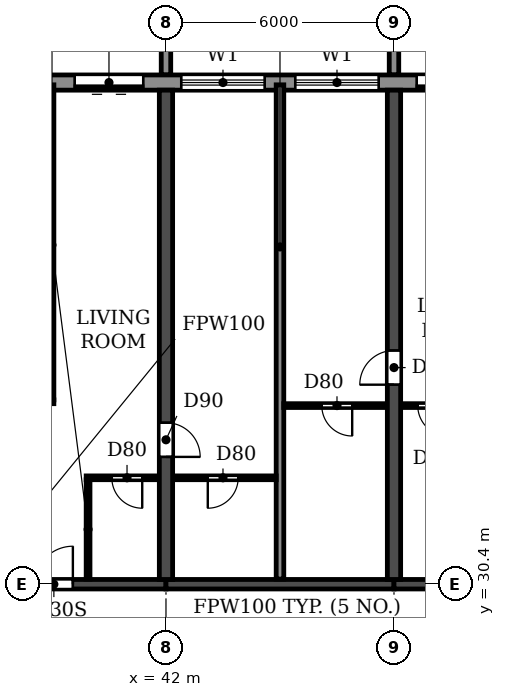
"""IFC4 building model, lengths in metres.
Left out: names, types, materials, properties, quantities, classifications, styles, units other than length and angle.
Written with IfcOpenShell. Run it as: python <this file> out.ifc"""

import sys

from ifc_helpers import new_model, si_unit, direction, frame, frame_2d, origin, place, context, subcontext, project, spatial, polyline, rectangle, outline, extrude, source, transform, mapped, element, fill, save


model = new_model("IFC4")
c1 = context("Model", 3, precision=1e-05, world=origin(), true_north=direction((0.0, 1.0)))
c2 = subcontext(c1, "Body", "Model", "MODEL_VIEW")
j1 = project(units=[si_unit("LENGTHUNIT", "METRE"), si_unit("PLANEANGLEUNIT", "RADIAN")], contexts=[c1])
p1 = place(None, origin())
s1 = spatial("IfcSite", under=j1, at=p1, CompositionType="ELEMENT")
p2 = place(p1, origin())
s2 = spatial("IfcBuilding", under=s1, at=p2, CompositionType="ELEMENT")
p3 = place(p2, frame((0.0, 0.0, 109.2)))
s3 = spatial("IfcBuildingStorey", under=s2, at=p3, CompositionType="ELEMENT", Elevation=109.2)
p4 = place(p3, frame((42.0, 30.525, 0.0), z_axis=(0.0, 0.0, 1.0), x_axis=(0.0, 1.0, 0.0)))
e1 = element("IfcWall", 1, at=p4, inside=s3, PredefinedType="SHEAR", context=c2, shape_type="SweptSolid", body=[
    extrude(rectangle(XDim=12.875, YDim=0.35, at=frame_2d((6.438, 0.0))), origin(), (0.0, 0.0, 1.0), 3.06),
])
p5 = place(p4, frame((3.225, 0.0, 0.0)))
e2 = element("IfcOpeningElement", 2, at=p5, cuts=e1, PredefinedType="OPENING", context=c2, shape_type="SweptSolid", body=[
    extrude(rectangle(XDim=0.9, YDim=2.1, at=frame_2d((0.45, 1.05))), frame((0.0, 0.185, 0.0), z_axis=(0.0, -1.0, 0.0), x_axis=(1.0, 0.0, 0.0)), (0.0, 0.0, 1.0), 0.37),
])
p6 = place(p3, frame((48.0, 30.525, 0.0), z_axis=(0.0, 0.0, 1.0), x_axis=(0.0, 1.0, 0.0)))
e3 = element("IfcWall", 3, at=p6, inside=s3, PredefinedType="SHEAR", context=c2, shape_type="SweptSolid", body=[
    extrude(rectangle(XDim=12.875, YDim=0.35, at=frame_2d((6.438, 0.0))), origin(), (0.0, 0.0, 1.0), 3.06),
])
p7 = place(p6, frame((5.125, 0.0, 0.0)))
e4 = element("IfcOpeningElement", 4, at=p7, cuts=e3, PredefinedType="OPENING", context=c2, shape_type="SweptSolid", body=[
    extrude(rectangle(XDim=0.9, YDim=2.1, at=frame_2d((0.45, 1.05))), frame((0.0, 0.185, 0.0), z_axis=(0.0, -1.0, 0.0), x_axis=(1.0, 0.0, 0.0)), (0.0, 0.0, 1.0), 0.37),
])
p8 = place(p3, frame((36.0, 30.4, 0.0), z_axis=(0.0, 0.0, 1.0), x_axis=(1.0, 0.0, 0.0)))
e5 = element("IfcWall", 5, at=p8, inside=s3, PredefinedType="SHEAR", context=c2, shape_type="SweptSolid", body=[
    extrude(rectangle(XDim=6.0, YDim=0.25, at=frame_2d((3.0, 0.0))), origin(), (0.0, 0.0, 1.0), 2.46),
])
p9 = place(p8, frame((2.55, 0.0, 0.0)))
e6 = element("IfcOpeningElement", 6, at=p9, cuts=e5, PredefinedType="OPENING", context=c2, shape_type="SweptSolid", body=[
    extrude(rectangle(XDim=1.0, YDim=2.1, at=frame_2d((0.5, 1.05))), frame((0.0, 0.135, 0.0), z_axis=(0.0, -1.0, 0.0), x_axis=(1.0, 0.0, 0.0)), (0.0, 0.0, 1.0), 0.27),
])
p10 = place(p3, frame((42.0, 30.4, 0.0), z_axis=(0.0, 0.0, 1.0), x_axis=(1.0, 0.0, 0.0)))
e7 = element("IfcWall", 7, at=p10, inside=s3, PredefinedType="SHEAR", context=c2, shape_type="SweptSolid", body=[
    extrude(rectangle(XDim=6.0, YDim=0.25, at=frame_2d((3.0, 0.0))), origin(), (0.0, 0.0, 1.0), 2.46),
])
p11 = place(p3, frame((48.0, 30.4, 0.0), z_axis=(0.0, 0.0, 1.0), x_axis=(1.0, 0.0, 0.0)))
e8 = element("IfcWall", 8, at=p11, inside=s3, PredefinedType="SHEAR", context=c2, shape_type="SweptSolid", body=[
    extrude(rectangle(XDim=6.0, YDim=0.25, at=frame_2d((3.0, 0.0))), origin(), (0.0, 0.0, 1.0), 2.46),
])
p12 = place(p11, frame((2.45, 0.0, 0.0)))
e9 = element("IfcOpeningElement", 9, at=p12, cuts=e8, PredefinedType="OPENING", context=c2, shape_type="SweptSolid", body=[
    extrude(rectangle(XDim=1.0, YDim=2.1, at=frame_2d((0.5, 1.05))), frame((0.0, 0.135, 0.0), z_axis=(0.0, -1.0, 0.0), x_axis=(1.0, 0.0, 0.0)), (0.0, 0.0, 1.0), 0.27),
])
p13 = place(p3, frame((85.317, 43.6, 0.0), z_axis=(0.0, 0.0, 1.0), x_axis=(-1.0, 0.0, 0.0)))
e10 = element("IfcWall", 10, at=p13, inside=s3, PredefinedType="STANDARD", context=c2, shape_type="SweptSolid", body=[
    extrude(rectangle(XDim=68.634, YDim=0.4, at=frame_2d((34.317, 0.0))), origin(), (0.0, 0.0, 1.0), 3.06),
])
p14 = place(p13, frame((64.917, 0.0, 0.0)))
e11 = element("IfcOpeningElement", 11, at=p14, cuts=e10, PredefinedType="OPENING", context=c2, shape_type="SweptSolid", body=[
    extrude(rectangle(XDim=1.8, YDim=2.4, at=frame_2d((0.9, 1.2))), frame((0.0, 0.21, 0.0), z_axis=(0.0, -1.0, 0.0), x_axis=(1.0, 0.0, 0.0)), (0.0, 0.0, 1.0), 0.42),
])
p15 = place(p13, frame((61.717, 0.0, 0.9)))
e12 = element("IfcOpeningElement", 12, at=p15, cuts=e10, PredefinedType="OPENING", context=c2, shape_type="SweptSolid", body=[
    extrude(rectangle(XDim=2.2, YDim=1.5, at=frame_2d((1.1, 0.75))), frame((0.0, 0.21, 0.0), z_axis=(0.0, -1.0, 0.0), x_axis=(1.0, 0.0, 0.0)), (0.0, 0.0, 1.0), 0.42),
])
p16 = place(p13, frame((58.717, 0.0, 0.9)))
e13 = element("IfcOpeningElement", 13, at=p16, cuts=e10, PredefinedType="OPENING", context=c2, shape_type="SweptSolid", body=[
    extrude(rectangle(XDim=2.2, YDim=1.5, at=frame_2d((1.1, 0.75))), frame((0.0, 0.21, 0.0), z_axis=(0.0, -1.0, 0.0), x_axis=(1.0, 0.0, 0.0)), (0.0, 0.0, 1.0), 0.42),
])
p17 = place(p13, frame((55.917, 0.0, 0.0)))
e14 = element("IfcOpeningElement", 14, at=p17, cuts=e10, PredefinedType="OPENING", context=c2, shape_type="SweptSolid", body=[
    extrude(rectangle(XDim=1.8, YDim=2.4, at=frame_2d((0.9, 1.2))), frame((0.0, 0.21, 0.0), z_axis=(0.0, -1.0, 0.0), x_axis=(1.0, 0.0, 0.0)), (0.0, 0.0, 1.0), 0.42),
])
p18 = place(p13, frame((52.917, 0.0, 0.0)))
e15 = element("IfcOpeningElement", 15, at=p18, cuts=e10, PredefinedType="OPENING", context=c2, shape_type="SweptSolid", body=[
    extrude(rectangle(XDim=1.8, YDim=2.4, at=frame_2d((0.9, 1.2))), frame((0.0, 0.21, 0.0), z_axis=(0.0, -1.0, 0.0), x_axis=(1.0, 0.0, 0.0)), (0.0, 0.0, 1.0), 0.42),
])
p19 = place(p13, frame((49.717, 0.0, 0.9)))
e16 = element("IfcOpeningElement", 16, at=p19, cuts=e10, PredefinedType="OPENING", context=c2, shape_type="SweptSolid", body=[
    extrude(rectangle(XDim=2.2, YDim=1.5, at=frame_2d((1.1, 0.75))), frame((0.0, 0.21, 0.0), z_axis=(0.0, -1.0, 0.0), x_axis=(1.0, 0.0, 0.0)), (0.0, 0.0, 1.0), 0.42),
])
p20 = place(p13, frame((46.717, 0.0, 0.9)))
e17 = element("IfcOpeningElement", 17, at=p20, cuts=e10, PredefinedType="OPENING", context=c2, shape_type="SweptSolid", body=[
    extrude(rectangle(XDim=2.2, YDim=1.5, at=frame_2d((1.1, 0.75))), frame((0.0, 0.21, 0.0), z_axis=(0.0, -1.0, 0.0), x_axis=(1.0, 0.0, 0.0)), (0.0, 0.0, 1.0), 0.42),
])
p21 = place(p13, frame((43.917, 0.0, 0.0)))
e18 = element("IfcOpeningElement", 18, at=p21, cuts=e10, PredefinedType="OPENING", context=c2, shape_type="SweptSolid", body=[
    extrude(rectangle(XDim=1.8, YDim=2.4, at=frame_2d((0.9, 1.2))), frame((0.0, 0.21, 0.0), z_axis=(0.0, -1.0, 0.0), x_axis=(1.0, 0.0, 0.0)), (0.0, 0.0, 1.0), 0.42),
])
p22 = place(p13, frame((40.717, 0.0, 0.9)))
e19 = element("IfcOpeningElement", 19, at=p22, cuts=e10, PredefinedType="OPENING", context=c2, shape_type="SweptSolid", body=[
    extrude(rectangle(XDim=2.2, YDim=1.5, at=frame_2d((1.1, 0.75))), frame((0.0, 0.21, 0.0), z_axis=(0.0, -1.0, 0.0), x_axis=(1.0, 0.0, 0.0)), (0.0, 0.0, 1.0), 0.42),
])
p23 = place(p13, frame((37.717, 0.0, 0.9)))
e20 = element("IfcOpeningElement", 20, at=p23, cuts=e10, PredefinedType="OPENING", context=c2, shape_type="SweptSolid", body=[
    extrude(rectangle(XDim=2.2, YDim=1.5, at=frame_2d((1.1, 0.75))), frame((0.0, 0.21, 0.0), z_axis=(0.0, -1.0, 0.0), x_axis=(1.0, 0.0, 0.0)), (0.0, 0.0, 1.0), 0.42),
])
p24 = place(p13, frame((34.917, 0.0, 0.0)))
e21 = element("IfcOpeningElement", 21, at=p24, cuts=e10, PredefinedType="OPENING", context=c2, shape_type="SweptSolid", body=[
    extrude(rectangle(XDim=1.8, YDim=2.4, at=frame_2d((0.9, 1.2))), frame((0.0, 0.21, 0.0), z_axis=(0.0, -1.0, 0.0), x_axis=(1.0, 0.0, 0.0)), (0.0, 0.0, 1.0), 0.42),
])
p25 = place(p13, frame((31.717, 0.0, 0.9)))
e22 = element("IfcOpeningElement", 22, at=p25, cuts=e10, PredefinedType="OPENING", context=c2, shape_type="SweptSolid", body=[
    extrude(rectangle(XDim=2.2, YDim=1.5, at=frame_2d((1.1, 0.75))), frame((0.0, 0.21, 0.0), z_axis=(0.0, -1.0, 0.0), x_axis=(1.0, 0.0, 0.0)), (0.0, 0.0, 1.0), 0.42),
])
p26 = place(p13, frame((28.917, 0.0, 0.0)))
e23 = element("IfcOpeningElement", 23, at=p26, cuts=e10, PredefinedType="OPENING", context=c2, shape_type="SweptSolid", body=[
    extrude(rectangle(XDim=1.8, YDim=2.4, at=frame_2d((0.9, 1.2))), frame((0.0, 0.21, 0.0), z_axis=(0.0, -1.0, 0.0), x_axis=(1.0, 0.0, 0.0)), (0.0, 0.0, 1.0), 0.42),
])
p27 = place(p13, frame((25.717, 0.0, 0.9)))
e24 = element("IfcOpeningElement", 24, at=p27, cuts=e10, PredefinedType="OPENING", context=c2, shape_type="SweptSolid", body=[
    extrude(rectangle(XDim=2.2, YDim=1.5, at=frame_2d((1.1, 0.75))), frame((0.0, 0.21, 0.0), z_axis=(0.0, -1.0, 0.0), x_axis=(1.0, 0.0, 0.0)), (0.0, 0.0, 1.0), 0.42),
])
p28 = place(p13, frame((22.717, 0.0, 0.9)))
e25 = element("IfcOpeningElement", 25, at=p28, cuts=e10, PredefinedType="OPENING", context=c2, shape_type="SweptSolid", body=[
    extrude(rectangle(XDim=2.2, YDim=1.5, at=frame_2d((1.1, 0.75))), frame((0.0, 0.21, 0.0), z_axis=(0.0, -1.0, 0.0), x_axis=(1.0, 0.0, 0.0)), (0.0, 0.0, 1.0), 0.42),
])
p29 = place(p13, frame((19.917, 0.0, 0.0)))
e26 = element("IfcOpeningElement", 26, at=p29, cuts=e10, PredefinedType="OPENING", context=c2, shape_type="SweptSolid", body=[
    extrude(rectangle(XDim=1.8, YDim=2.4, at=frame_2d((0.9, 1.2))), frame((0.0, 0.21, 0.0), z_axis=(0.0, -1.0, 0.0), x_axis=(1.0, 0.0, 0.0)), (0.0, 0.0, 1.0), 0.42),
])
p30 = place(p13, frame((16.717, 0.0, 0.9)))
e27 = element("IfcOpeningElement", 27, at=p30, cuts=e10, PredefinedType="OPENING", context=c2, shape_type="SweptSolid", body=[
    extrude(rectangle(XDim=2.2, YDim=1.5, at=frame_2d((1.1, 0.75))), frame((0.0, 0.21, 0.0), z_axis=(0.0, -1.0, 0.0), x_axis=(1.0, 0.0, 0.0)), (0.0, 0.0, 1.0), 0.42),
])
p31 = place(p13, frame((13.917, 0.0, 0.0)))
e28 = element("IfcOpeningElement", 28, at=p31, cuts=e10, PredefinedType="OPENING", context=c2, shape_type="SweptSolid", body=[
    extrude(rectangle(XDim=1.8, YDim=2.4, at=frame_2d((0.9, 1.2))), frame((0.0, 0.21, 0.0), z_axis=(0.0, -1.0, 0.0), x_axis=(1.0, 0.0, 0.0)), (0.0, 0.0, 1.0), 0.42),
])
p32 = place(p13, frame((10.717, 0.0, 0.9)))
e29 = element("IfcOpeningElement", 29, at=p32, cuts=e10, PredefinedType="OPENING", context=c2, shape_type="SweptSolid", body=[
    extrude(rectangle(XDim=2.2, YDim=1.5, at=frame_2d((1.1, 0.75))), frame((0.0, 0.21, 0.0), z_axis=(0.0, -1.0, 0.0), x_axis=(1.0, 0.0, 0.0)), (0.0, 0.0, 1.0), 0.42),
])
p33 = place(p13, frame((7.717, 0.0, 0.9)))
e30 = element("IfcOpeningElement", 30, at=p33, cuts=e10, PredefinedType="OPENING", context=c2, shape_type="SweptSolid", body=[
    extrude(rectangle(XDim=2.2, YDim=1.5, at=frame_2d((1.1, 0.75))), frame((0.0, 0.21, 0.0), z_axis=(0.0, -1.0, 0.0), x_axis=(1.0, 0.0, 0.0)), (0.0, 0.0, 1.0), 0.42),
])
p34 = place(p13, frame((4.917, 0.0, 0.0)))
e31 = element("IfcOpeningElement", 31, at=p34, cuts=e10, PredefinedType="OPENING", context=c2, shape_type="SweptSolid", body=[
    extrude(rectangle(XDim=1.8, YDim=2.4, at=frame_2d((0.9, 1.2))), frame((0.0, 0.21, 0.0), z_axis=(0.0, -1.0, 0.0), x_axis=(1.0, 0.0, 0.0)), (0.0, 0.0, 1.0), 0.42),
])
p35 = place(p13, frame((1.717, 0.0, 0.9)))
e32 = element("IfcOpeningElement", 32, at=p35, cuts=e10, PredefinedType="OPENING", context=c2, shape_type="SweptSolid", body=[
    extrude(rectangle(XDim=2.2, YDim=1.5, at=frame_2d((1.1, 0.75))), frame((0.0, 0.21, 0.0), z_axis=(0.0, -1.0, 0.0), x_axis=(1.0, 0.0, 0.0)), (0.0, 0.0, 1.0), 0.42),
])
m1 = source(origin(), c2, "Body", "SweptSolid", [
    extrude(outline(polyline([(0.0, 0.0), (0.25, 0.0), (0.25, 3.1), (0.0, 3.1), (0.0, 0.0)])), origin(), (0.0, 0.0, 1.0), 3.1),
])
for number, where in (
    (33, (41.875, 43.8, 0.0)),
    (34, (47.875, 43.8, 0.0)),
):
    element("IfcWall", number, at=place(p3, frame(where)), inside=s3, PredefinedType="STANDARD", context=c2, shape_type="MappedRepresentation", body=[
        mapped(m1, transform((0.0, 0.0, 0.0))),
    ])
p36 = place(p3, frame((45.0, 30.535, 0.0), z_axis=(0.0, 0.0, 1.0), x_axis=(0.0, 1.0, 0.0)))
e35 = element("IfcWall", 35, at=p36, inside=s3, PredefinedType="PARTITIONING", context=c2, shape_type="SweptSolid", body=[
    extrude(rectangle(XDim=13.005, YDim=0.2, at=frame_2d((6.502, 0.0))), origin(), (0.0, 0.0, 1.0), 3.06),
])
p37 = place(p3, frame((39.9, 33.2, 0.0), z_axis=(0.0, 0.0, 1.0), x_axis=(1.0, 0.0, 0.0)))
e36 = element("IfcWall", 36, at=p37, inside=s3, PredefinedType="PARTITIONING", context=c2, shape_type="SweptSolid", body=[
    extrude(rectangle(XDim=1.915, YDim=0.1, at=frame_2d((0.958, 0.0))), origin(), (0.0, 0.0, 1.0), 3.06),
])
p38 = place(p37, frame((0.675, 0.0, 0.0)))
e37 = element("IfcOpeningElement", 37, at=p38, cuts=e36, PredefinedType="OPENING", context=c2, shape_type="SweptSolid", body=[
    extrude(rectangle(XDim=0.8, YDim=2.1, at=frame_2d((0.4, 1.05))), frame((0.0, 0.06, 0.0), z_axis=(0.0, -1.0, 0.0), x_axis=(1.0, 0.0, 0.0)), (0.0, 0.0, 1.0), 0.12),
])
p39 = place(p3, frame((42.185, 33.2, 0.0), z_axis=(0.0, 0.0, 1.0), x_axis=(1.0, 0.0, 0.0)))
e38 = element("IfcWall", 38, at=p39, inside=s3, PredefinedType="PARTITIONING", context=c2, shape_type="SweptSolid", body=[
    extrude(rectangle(XDim=2.715, YDim=0.1, at=frame_2d((1.357, 0.0))), origin(), (0.0, 0.0, 1.0), 3.06),
])
p40 = place(p39, frame((0.915, 0.0, 0.0)))
e39 = element("IfcOpeningElement", 39, at=p40, cuts=e38, PredefinedType="OPENING", context=c2, shape_type="SweptSolid", body=[
    extrude(rectangle(XDim=0.8, YDim=2.1, at=frame_2d((0.4, 1.05))), frame((0.0, 0.06, 0.0), z_axis=(0.0, -1.0, 0.0), x_axis=(1.0, 0.0, 0.0)), (0.0, 0.0, 1.0), 0.12),
])
p41 = place(p3, frame((45.1, 35.1, 0.0), z_axis=(0.0, 0.0, 1.0), x_axis=(1.0, 0.0, 0.0)))
e40 = element("IfcWall", 40, at=p41, inside=s3, PredefinedType="PARTITIONING", context=c2, shape_type="SweptSolid", body=[
    extrude(rectangle(XDim=2.715, YDim=0.1, at=frame_2d((1.357, 0.0))), origin(), (0.0, 0.0, 1.0), 3.06),
])
p42 = place(p41, frame((1.0, 0.0, 0.0)))
e41 = element("IfcOpeningElement", 41, at=p42, cuts=e40, PredefinedType="OPENING", context=c2, shape_type="SweptSolid", body=[
    extrude(rectangle(XDim=0.8, YDim=2.1, at=frame_2d((0.4, 1.05))), frame((0.0, 0.06, 0.0), z_axis=(0.0, -1.0, 0.0), x_axis=(1.0, 0.0, 0.0)), (0.0, 0.0, 1.0), 0.12),
])
p43 = place(p3, frame((48.185, 35.1, 0.0), z_axis=(0.0, 0.0, 1.0), x_axis=(1.0, 0.0, 0.0)))
e42 = element("IfcWall", 42, at=p43, inside=s3, PredefinedType="PARTITIONING", context=c2, shape_type="SweptSolid", body=[
    extrude(rectangle(XDim=1.915, YDim=0.1, at=frame_2d((0.958, 0.0))), origin(), (0.0, 0.0, 1.0), 3.06),
])
p44 = place(p43, frame((0.44, 0.0, 0.0)))
e43 = element("IfcOpeningElement", 43, at=p44, cuts=e42, PredefinedType="OPENING", context=c2, shape_type="SweptSolid", body=[
    extrude(rectangle(XDim=0.8, YDim=2.1, at=frame_2d((0.4, 1.05))), frame((0.0, 0.06, 0.0), z_axis=(0.0, -1.0, 0.0), x_axis=(1.0, 0.0, 0.0)), (0.0, 0.0, 1.0), 0.12),
])
p45 = place(p3, frame((36.185, 35.2, 0.0), z_axis=(0.0, 0.0, 1.0), x_axis=(1.0, 0.0, 0.0)))
e44 = element("IfcWall", 44, at=p45, inside=s3, PredefinedType="PARTITIONING", context=c2, shape_type="SweptSolid", body=[
    extrude(rectangle(XDim=2.865, YDim=0.1, at=frame_2d((1.433, 0.0))), origin(), (0.0, 0.0, 1.0), 3.06),
])
p46 = place(p45, frame((0.315, 0.0, 0.0)))
e45 = element("IfcOpeningElement", 45, at=p46, cuts=e44, PredefinedType="OPENING", context=c2, shape_type="SweptSolid", body=[
    extrude(rectangle(XDim=0.9, YDim=2.1, at=frame_2d((0.45, 1.05))), frame((0.0, 0.06, 0.0), z_axis=(0.0, -1.0, 0.0), x_axis=(1.0, 0.0, 0.0)), (0.0, 0.0, 1.0), 0.12),
])
p47 = place(p3, frame((39.0, 35.25, 0.0), z_axis=(0.0, 0.0, 1.0), x_axis=(0.0, 1.0, 0.0)))
e46 = element("IfcWall", 46, at=p47, inside=s3, PredefinedType="PARTITIONING", context=c2, shape_type="SweptSolid", body=[
    extrude(rectangle(XDim=8.29, YDim=0.1, at=frame_2d((4.145, 0.0))), origin(), (0.0, 0.0, 1.0), 3.06),
])
p48 = place(p3, frame((39.95, 30.535, 0.0), z_axis=(0.0, 0.0, 1.0), x_axis=(0.0, 1.0, 0.0)))
e47 = element("IfcWall", 47, at=p48, inside=s3, PredefinedType="PARTITIONING", context=c2, shape_type="SweptSolid", body=[
    extrude(rectangle(XDim=2.615, YDim=0.1, at=frame_2d((1.308, 0.0))), origin(), (0.0, 0.0, 1.0), 3.06),
])
p49 = place(p21, origin())
e48 = element("IfcDoor", 48, at=p49, inside=s3, OperationType="DOUBLE_DOOR_SLIDING", PredefinedType="DOOR", context=c2, shape_type="SweptSolid", body=[
    extrude(rectangle(XDim=1.8, YDim=2.4, at=frame_2d((0.9, 1.2))), frame((0.0, 0.025, 0.0), z_axis=(0.0, -1.0, 0.0), x_axis=(1.0, 0.0, 0.0)), (0.0, 0.0, 1.0), 0.05),
])
fill(e18, e48)
p50 = place(p22, origin())
e49 = element("IfcWindow", 49, at=p50, inside=s3, PartitioningType="DOUBLE_PANEL_HORIZONTAL", PredefinedType="WINDOW", context=c2, shape_type="SweptSolid", body=[
    extrude(rectangle(XDim=2.2, YDim=1.5, at=frame_2d((1.1, 0.75))), frame((0.0, 0.03, 0.0), z_axis=(0.0, -1.0, 0.0), x_axis=(1.0, 0.0, 0.0)), (0.0, 0.0, 1.0), 0.06),
])
fill(e19, e49)
p51 = place(p23, origin())
e50 = element("IfcWindow", 50, at=p51, inside=s3, PartitioningType="DOUBLE_PANEL_HORIZONTAL", PredefinedType="WINDOW", context=c2, shape_type="SweptSolid", body=[
    extrude(rectangle(XDim=2.2, YDim=1.5, at=frame_2d((1.1, 0.75))), frame((0.0, 0.03, 0.0), z_axis=(0.0, -1.0, 0.0), x_axis=(1.0, 0.0, 0.0)), (0.0, 0.0, 1.0), 0.06),
])
fill(e20, e50)
p52 = place(p24, origin())
e51 = element("IfcDoor", 51, at=p52, inside=s3, OperationType="DOUBLE_DOOR_SLIDING", PredefinedType="DOOR", context=c2, shape_type="SweptSolid", body=[
    extrude(rectangle(XDim=1.8, YDim=2.4, at=frame_2d((0.9, 1.2))), frame((0.0, 0.025, 0.0), z_axis=(0.0, -1.0, 0.0), x_axis=(1.0, 0.0, 0.0)), (0.0, 0.0, 1.0), 0.05),
])
fill(e21, e51)
p53 = place(p40, frame((0.8, 0.0, 0.0), z_axis=(0.0, 0.0, 1.0), x_axis=(-1.0, 0.0, 0.0)))
e52 = element("IfcDoor", 52, at=p53, inside=s3, OperationType="SINGLE_SWING_RIGHT", PredefinedType="DOOR", context=c2, shape_type="SweptSolid", body=[
    extrude(rectangle(XDim=0.8, YDim=2.1, at=frame_2d((0.4, 1.05))), frame((0.0, 0.025, 0.0), z_axis=(0.0, -1.0, 0.0), x_axis=(1.0, 0.0, 0.0)), (0.0, 0.0, 1.0), 0.05),
])
fill(e39, e52)
p54 = place(p9, origin())
e53 = element("IfcDoor", 53, at=p54, inside=s3, OperationType="SINGLE_SWING_RIGHT", PredefinedType="DOOR", context=c2, shape_type="SweptSolid", body=[
    extrude(rectangle(XDim=1.0, YDim=2.1, at=frame_2d((0.5, 1.05))), frame((0.0, 0.025, 0.0), z_axis=(0.0, -1.0, 0.0), x_axis=(1.0, 0.0, 0.0)), (0.0, 0.0, 1.0), 0.05),
])
fill(e6, e53)
p55 = place(p38, frame((0.8, 0.0, 0.0), z_axis=(0.0, 0.0, 1.0), x_axis=(-1.0, 0.0, 0.0)))
e54 = element("IfcDoor", 54, at=p55, inside=s3, OperationType="SINGLE_SWING_LEFT", PredefinedType="DOOR", context=c2, shape_type="SweptSolid", body=[
    extrude(rectangle(XDim=0.8, YDim=2.1, at=frame_2d((0.4, 1.05))), frame((0.0, 0.025, 0.0), z_axis=(0.0, -1.0, 0.0), x_axis=(1.0, 0.0, 0.0)), (0.0, 0.0, 1.0), 0.05),
])
fill(e37, e54)
p56 = place(p5, frame((0.9, 0.0, 0.0), z_axis=(0.0, 0.0, 1.0), x_axis=(-1.0, 0.0, 0.0)))
e55 = element("IfcDoor", 55, at=p56, inside=s3, OperationType="SINGLE_SWING_RIGHT", PredefinedType="DOOR", context=c2, shape_type="SweptSolid", body=[
    extrude(rectangle(XDim=0.9, YDim=2.1, at=frame_2d((0.45, 1.05))), frame((0.0, 0.025, 0.0), z_axis=(0.0, -1.0, 0.0), x_axis=(1.0, 0.0, 0.0)), (0.0, 0.0, 1.0), 0.05),
])
fill(e2, e55)
p57 = place(p42, frame((0.8, 0.0, 0.0), z_axis=(0.0, 0.0, 1.0), x_axis=(-1.0, 0.0, 0.0)))
e56 = element("IfcDoor", 56, at=p57, inside=s3, OperationType="SINGLE_SWING_LEFT", PredefinedType="DOOR", context=c2, shape_type="SweptSolid", body=[
    extrude(rectangle(XDim=0.8, YDim=2.1, at=frame_2d((0.4, 1.05))), frame((0.0, 0.025, 0.0), z_axis=(0.0, -1.0, 0.0), x_axis=(1.0, 0.0, 0.0)), (0.0, 0.0, 1.0), 0.05),
])
fill(e41, e56)
p58 = place(p7, origin())
e57 = element("IfcDoor", 57, at=p58, inside=s3, OperationType="SINGLE_SWING_LEFT", PredefinedType="DOOR", context=c2, shape_type="SweptSolid", body=[
    extrude(rectangle(XDim=0.9, YDim=2.1, at=frame_2d((0.45, 1.05))), frame((0.0, 0.025, 0.0), z_axis=(0.0, -1.0, 0.0), x_axis=(1.0, 0.0, 0.0)), (0.0, 0.0, 1.0), 0.05),
])
fill(e4, e57)
p59 = place(p44, frame((0.8, 0.0, 0.0), z_axis=(0.0, 0.0, 1.0), x_axis=(-1.0, 0.0, 0.0)))
e58 = element("IfcDoor", 58, at=p59, inside=s3, OperationType="SINGLE_SWING_LEFT", PredefinedType="DOOR", context=c2, shape_type="SweptSolid", body=[
    extrude(rectangle(XDim=0.8, YDim=2.1, at=frame_2d((0.4, 1.05))), frame((0.0, 0.025, 0.0), z_axis=(0.0, -1.0, 0.0), x_axis=(1.0, 0.0, 0.0)), (0.0, 0.0, 1.0), 0.05),
])
fill(e43, e58)
save(model, sys.argv[1])
